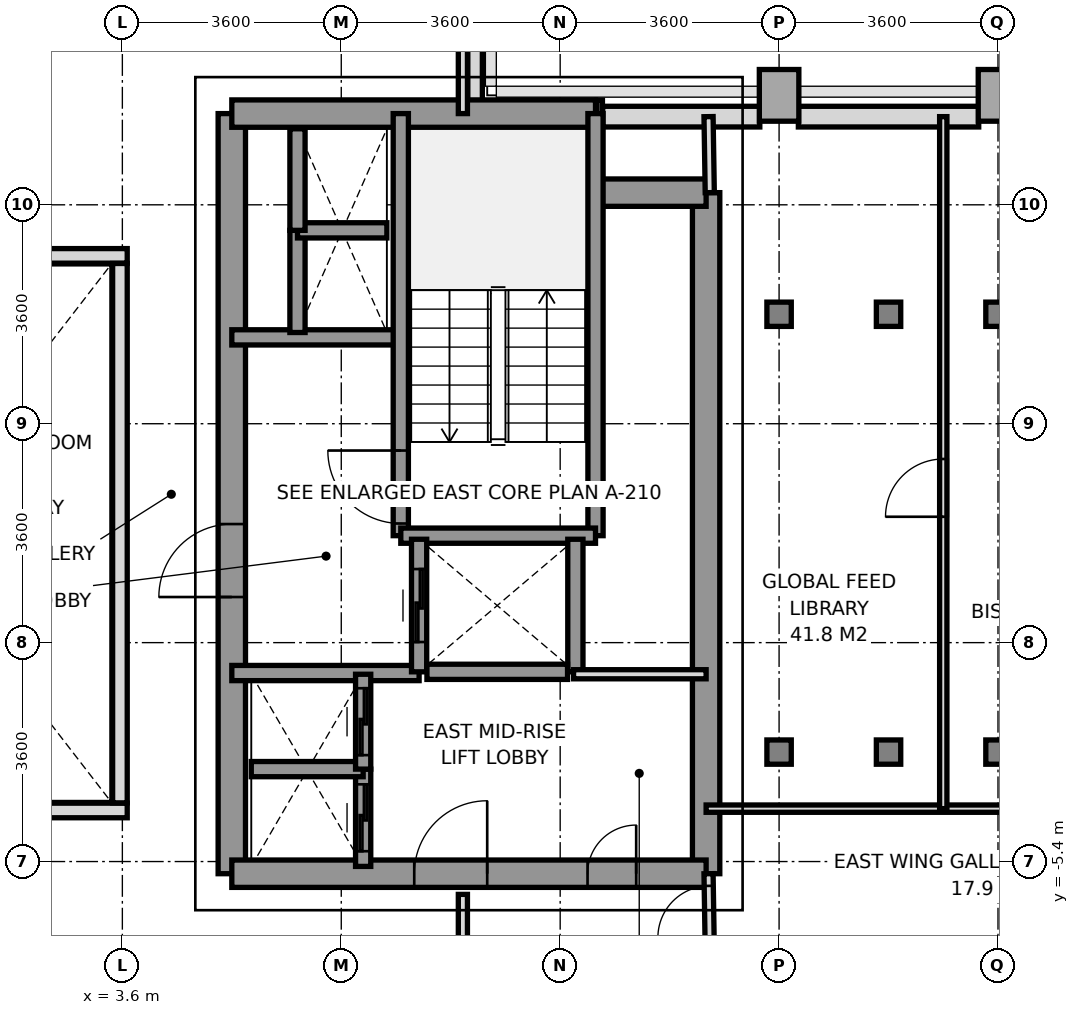
"""IFC4 building model, lengths in metres.
Left out: names, types, materials, properties, quantities, classifications, styles, units other than length and angle.
Written with IfcOpenShell. Run it as: python <this file> out.ifc"""

import sys

from ifc_helpers import new_model, si_unit, direction, frame, frame_2d, origin, origin_2d, place, context, subcontext, project, spatial, rectangle, i_section, extrude, source, transform, mapped, element, fill, save


model = new_model("IFC4")
c1 = context("Model", 3, precision=1e-05, world=origin(), true_north=direction((0.0, 1.0)))
c2 = subcontext(c1, "Body", "Model", "MODEL_VIEW")
j1 = project(units=[si_unit("LENGTHUNIT", "METRE"), si_unit("PLANEANGLEUNIT", "RADIAN")], contexts=[c1])
p1 = place(None, origin())
s1 = spatial("IfcSite", under=j1, at=p1, CompositionType="ELEMENT")
p2 = place(p1, origin())
s2 = spatial("IfcBuilding", under=s1, at=p2, CompositionType="ELEMENT")
p3 = place(p2, frame((0.0, 0.0, 117.6)))
s3 = spatial("IfcBuildingStorey", under=s2, at=p3, CompositionType="ELEMENT", Elevation=117.6)
m1 = source(origin(), c2, "Body", "SweptSolid", [
    extrude(i_section(OverallWidth=0.401, OverallDepth=0.399, WebThickness=0.02, FlangeThickness=0.032, at=origin_2d()), origin(), (0.0, 0.0, 1.0), 3.2),
])
for number, where, z_axis, x_axis in (
    (1, (14.4, -3.6, 0.0), (0.0, 0.0, 1.0), (1.0, 0.0, 0.0)),
    (2, (14.4, 3.6, 0.0), (0.0, 0.0, 1.0), (1.0, 0.0, 0.0)),
):
    element("IfcColumn", number, at=place(p3, frame(where, z_axis=z_axis, x_axis=x_axis)), inside=s3, PredefinedType="COLUMN", context=c2, shape_type="MappedRepresentation", body=[
        mapped(m1, transform((0.0, 0.0, 0.0), x_axis=(1.0, 0.0, 0.0), y_axis=(0.0, 1.0, 0.0), z_axis=(0.0, 0.0, 1.0), scale=1.0)),
    ])
m2 = source(origin(), c2, "Body", "SweptSolid", [
    extrude(rectangle(XDim=0.65, YDim=0.85, at=origin_2d()), origin(), (0.0, 0.0, 1.0), 3.2),
])
p4 = place(p3, frame((14.4, 7.2, 0.0), z_axis=(0.0, 0.0, 1.0), x_axis=(1.0, 0.0, 0.0)))
e3 = element("IfcColumn", 3, at=p4, inside=s3, PredefinedType="COLUMN", context=c2, shape_type="MappedRepresentation", body=[
    mapped(m2, transform((0.0, 0.0, 0.0), x_axis=(1.0, 0.0, 0.0), y_axis=(0.0, 1.0, 0.0), z_axis=(0.0, 0.0, 1.0), scale=1.0)),
])
for number, where, z_axis, x_axis in (
    (4, (16.2, -3.6, 0.0), (0.0, 0.0, 1.0), (1.0, 0.0, 0.0)),
    (5, (16.2, 3.6, 0.0), (0.0, 0.0, 1.0), (1.0, 0.0, 0.0)),
    (6, (18.0, -3.6, 0.0), (0.0, 0.0, 1.0), (1.0, 0.0, 0.0)),
    (7, (18.0, 3.6, 0.0), (0.0, 0.0, 1.0), (1.0, 0.0, 0.0)),
):
    element("IfcColumn", number, at=place(p3, frame(where, z_axis=z_axis, x_axis=x_axis)), inside=s3, PredefinedType="COLUMN", context=c2, shape_type="MappedRepresentation", body=[
        mapped(m1, transform((0.0, 0.0, 0.0), x_axis=(1.0, 0.0, 0.0), y_axis=(0.0, 1.0, 0.0), z_axis=(0.0, 0.0, 1.0), scale=1.0)),
    ])
p5 = place(p3, frame((18.0, 7.2, 0.0), z_axis=(0.0, 0.0, 1.0), x_axis=(1.0, 0.0, 0.0)))
e8 = element("IfcColumn", 8, at=p5, inside=s3, PredefinedType="COLUMN", context=c2, shape_type="MappedRepresentation", body=[
    mapped(m2, transform((0.0, 0.0, 0.0), x_axis=(1.0, 0.0, 0.0), y_axis=(0.0, 1.0, 0.0), z_axis=(0.0, 0.0, 1.0), scale=1.0)),
])
p6 = place(p3, frame((11.498, 6.85, 0.0), z_axis=(0.0, 0.0, 1.0), x_axis=(1.0, 0.0, 0.0)))
e9 = element("IfcWall", 9, at=p6, inside=s3, PredefinedType="SOLIDWALL", context=c2, shape_type="SweptSolid", body=[
    extrude(rectangle(XDim=2.585, YDim=0.34, at=frame_2d((1.292, 0.0))), origin(), (0.0, 0.0, 1.0), 3.2),
])
p7 = place(p3, frame((14.717, 6.85, 0.0), z_axis=(0.0, 0.0, 1.0), x_axis=(1.0, 0.0, 0.0)))
e10 = element("IfcWall", 10, at=p7, inside=s3, PredefinedType="SOLIDWALL", context=c2, shape_type="SweptSolid", body=[
    extrude(rectangle(XDim=2.966, YDim=0.34, at=frame_2d((1.483, 0.0))), origin(), (0.0, 0.0, 1.0), 2.45),
])
p8 = place(p3, frame((9.4, 8.472, 0.0), z_axis=(0.0, 0.0, 1.0), x_axis=(0.0, -1.0, 0.0)))
e11 = element("IfcWall", 11, at=p8, inside=s3, PredefinedType="PARAPET", context=c2, shape_type="SweptSolid", body=[
    extrude(rectangle(XDim=1.519, YDim=0.24, at=frame_2d((0.76, 0.0))), origin(), (0.0, 0.0, 1.0), 1.15),
])
p9 = place(p3, frame((11.403, 7.0, 0.0), z_axis=(0.0, 0.0, 1.0), x_axis=(1.0, 0.0, 0.0)))
e12 = element("IfcWall", 12, at=p9, inside=s3, PredefinedType="PARAPET", context=c2, shape_type="SweptSolid", body=[
    extrude(rectangle(XDim=0.092, YDim=0.24, at=frame_2d((0.046, 0.0))), origin(), (0.0, 0.0, 1.0), 1.15),
])
p10 = place(p3, frame((13.2, -5.6, 0.0), z_axis=(0.0, 0.0, 1.0), x_axis=(0.0, 1.0, 0.0)))
e13 = element("IfcWall", 13, at=p10, inside=s3, PredefinedType="SHEAR", context=c2, shape_type="SweptSolid", body=[
    extrude(rectangle(XDim=11.2, YDim=0.45, at=frame_2d((5.6, 0.0))), origin(), (0.0, 0.0, 1.0), 3.2),
])
p11 = place(p3, frame((5.4, -5.6, 0.0), z_axis=(0.0, 0.0, 1.0), x_axis=(0.0, 1.0, 0.0)))
e14 = element("IfcWall", 14, at=p11, inside=s3, PredefinedType="SHEAR", context=c2, shape_type="SweptSolid", body=[
    extrude(rectangle(XDim=12.5, YDim=0.45, at=frame_2d((6.25, 0.0))), origin(), (0.0, 0.0, 1.0), 3.2),
])
p12 = place(p11, frame((4.55, 0.0, 0.0)))
e15 = element("IfcOpeningElement", 15, at=p12, cuts=e14, PredefinedType="OPENING", context=c2, shape_type="SweptSolid", body=[
    extrude(rectangle(XDim=1.2, YDim=2.2, at=frame_2d((0.6, 1.1))), frame((0.0, 0.235, 0.0), z_axis=(0.0, -1.0, 0.0), x_axis=(1.0, 0.0, 0.0)), (0.0, 0.0, 1.0), 0.47),
])
p13 = place(p3, frame((5.4, 6.9, 0.0), z_axis=(0.0, 0.0, 1.0), x_axis=(1.0, 0.0, 0.0)))
e16 = element("IfcWall", 16, at=p13, inside=s3, PredefinedType="SHEAR", context=c2, shape_type="SweptSolid", body=[
    extrude(rectangle(XDim=5.981, YDim=0.45, at=frame_2d((2.991, 0.0))), origin(), (0.0, 0.0, 1.0), 3.2),
])
p14 = place(p3, frame((11.381, 5.6, 0.0), z_axis=(0.0, 0.0, 1.0), x_axis=(1.0, 0.0, 0.0)))
e17 = element("IfcWall", 17, at=p14, inside=s3, PredefinedType="SHEAR", context=c2, shape_type="SweptSolid", body=[
    extrude(rectangle(XDim=1.819, YDim=0.45, at=frame_2d((0.909, 0.0))), origin(), (0.0, 0.0, 1.0), 3.2),
])
p15 = place(p3, frame((5.4, -5.6, 0.0), z_axis=(0.0, 0.0, 1.0), x_axis=(1.0, 0.0, 0.0)))
e18 = element("IfcWall", 18, at=p15, inside=s3, PredefinedType="SHEAR", context=c2, shape_type="SweptSolid", body=[
    extrude(rectangle(XDim=7.8, YDim=0.45, at=frame_2d((3.9, 0.0))), origin(), (0.0, 0.0, 1.0), 3.2),
])
p16 = place(p15, frame((3.0, 0.0, 0.0)))
e19 = element("IfcOpeningElement", 19, at=p16, cuts=e18, PredefinedType="OPENING", context=c2, shape_type="SweptSolid", body=[
    extrude(rectangle(XDim=1.2, YDim=2.2, at=frame_2d((0.6, 1.1))), frame((0.0, 0.235, 0.0), z_axis=(0.0, -1.0, 0.0), x_axis=(1.0, 0.0, 0.0)), (0.0, 0.0, 1.0), 0.47),
])
p17 = place(p15, frame((5.85, 0.0, 0.0)))
e20 = element("IfcOpeningElement", 20, at=p17, cuts=e18, PredefinedType="OPENING", context=c2, shape_type="SweptSolid", body=[
    extrude(rectangle(XDim=0.8, YDim=2.1, at=frame_2d((0.4, 1.05))), frame((0.0, 0.235, 0.0), z_axis=(0.0, -1.0, 0.0), x_axis=(1.0, 0.0, 0.0)), (0.0, 0.0, 1.0), 0.47),
])
p18 = place(p3, frame((5.4, 3.22, 0.0), z_axis=(0.0, 0.0, 1.0), x_axis=(1.0, 0.0, 0.0)))
e21 = element("IfcWall", 21, at=p18, inside=s3, PredefinedType="SOLIDWALL", context=c2, shape_type="SweptSolid", body=[
    extrude(rectangle(XDim=2.78, YDim=0.25, at=frame_2d((1.39, 0.0))), origin(), (0.0, 0.0, 1.0), 3.2),
])
p19 = place(p3, frame((5.4, -2.3, 0.0), z_axis=(0.0, 0.0, 1.0), x_axis=(1.0, 0.0, 0.0)))
e22 = element("IfcWall", 22, at=p19, inside=s3, PredefinedType="SOLIDWALL", context=c2, shape_type="SweptSolid", body=[
    extrude(rectangle(XDim=3.08, YDim=0.25, at=frame_2d((1.54, 0.0))), origin(), (0.0, 0.0, 1.0), 3.2),
])
p20 = place(p3, frame((8.179, -0.041, 0.0), z_axis=(0.0, 0.0, 1.0), x_axis=(0.0, 1.0, 0.0)))
e23 = element("IfcWall", 23, at=p20, inside=s3, PredefinedType="SOLIDWALL", context=c2, shape_type="SweptSolid", body=[
    extrude(rectangle(XDim=6.941, YDim=0.25, at=frame_2d((3.47, 0.0))), origin(), (0.0, 0.0, 1.0), 3.2),
])
p21 = place(p20, frame((0.2, 0.0, 0.0)))
e24 = element("IfcOpeningElement", 24, at=p21, cuts=e23, PredefinedType="OPENING", context=c2, shape_type="SweptSolid", body=[
    extrude(rectangle(XDim=1.2, YDim=2.2, at=frame_2d((0.6, 1.1))), frame((0.0, 0.135, 0.0), z_axis=(0.0, -1.0, 0.0), x_axis=(1.0, 0.0, 0.0)), (0.0, 0.0, 1.0), 0.27),
])
p22 = place(p3, frame((11.381, -0.041, 0.0), z_axis=(0.0, 0.0, 1.0), x_axis=(0.0, 1.0, 0.0)))
e25 = element("IfcWall", 25, at=p22, inside=s3, PredefinedType="SOLIDWALL", context=c2, shape_type="SweptSolid", body=[
    extrude(rectangle(XDim=6.941, YDim=0.25, at=frame_2d((3.47, 0.0))), origin(), (0.0, 0.0, 1.0), 3.2),
])
p23 = place(p3, frame((8.179, -0.041, 0.0), z_axis=(0.0, 0.0, 1.0), x_axis=(1.0, 0.0, 0.0)))
e26 = element("IfcWall", 26, at=p23, inside=s3, PredefinedType="SOLIDWALL", context=c2, shape_type="SweptSolid", body=[
    extrude(rectangle(XDim=3.202, YDim=0.25, at=frame_2d((1.601, 0.0))), origin(), (0.0, 0.0, 1.0), 3.2),
])
p24 = place(p3, frame((8.48, -2.28, 0.0), z_axis=(0.0, 0.0, 1.0), x_axis=(0.0, 1.0, 0.0)))
e27 = element("IfcWall", 27, at=p24, inside=s3, PredefinedType="SOLIDWALL", context=c2, shape_type="SweptSolid", body=[
    extrude(rectangle(XDim=2.18, YDim=0.25, at=frame_2d((1.09, 0.0))), origin(), (0.0, 0.0, 1.0), 3.2),
])
p25 = place(p24, frame((0.49, 0.0, 0.0)))
e28 = element("IfcOpeningElement", 28, at=p25, cuts=e27, PredefinedType="OPENING", context=c2, shape_type="SweptSolid", body=[
    extrude(rectangle(XDim=1.2, YDim=2.2, at=frame_2d((0.6, 1.1))), frame((0.0, 0.135, 0.0), z_axis=(0.0, -1.0, 0.0), x_axis=(1.0, 0.0, 0.0)), (0.0, 0.0, 1.0), 0.27),
])
p26 = place(p3, frame((11.05, -2.28, 0.0), z_axis=(0.0, 0.0, 1.0), x_axis=(0.0, 1.0, 0.0)))
e29 = element("IfcWall", 29, at=p26, inside=s3, PredefinedType="SOLIDWALL", context=c2, shape_type="SweptSolid", body=[
    extrude(rectangle(XDim=2.18, YDim=0.25, at=frame_2d((1.09, 0.0))), origin(), (0.0, 0.0, 1.0), 3.2),
])
p27 = place(p3, frame((8.609, -2.28, 0.0), z_axis=(0.0, 0.0, 1.0), x_axis=(1.0, 0.0, 0.0)))
e30 = element("IfcWall", 30, at=p27, inside=s3, PredefinedType="SOLIDWALL", context=c2, shape_type="SweptSolid", body=[
    extrude(rectangle(XDim=2.312, YDim=0.25, at=frame_2d((1.156, 0.0))), origin(), (0.0, 0.0, 1.0), 3.2),
])
p28 = place(p3, frame((7.56, -5.48, 0.0), z_axis=(0.0, 0.0, 1.0), x_axis=(0.0, 1.0, 0.0)))
e31 = element("IfcWall", 31, at=p28, inside=s3, PredefinedType="SOLIDWALL", context=c2, shape_type="SweptSolid", body=[
    extrude(rectangle(XDim=1.6, YDim=0.25, at=frame_2d((0.8, 0.0))), origin(), (0.0, 0.0, 1.0), 3.2),
])
p29 = place(p28, frame((0.25, 0.0, 0.0)))
e32 = element("IfcOpeningElement", 32, at=p29, cuts=e31, PredefinedType="OPENING", context=c2, shape_type="SweptSolid", body=[
    extrude(rectangle(XDim=1.1, YDim=2.2, at=frame_2d((0.55, 1.1))), frame((0.0, 0.135, 0.0), z_axis=(0.0, -1.0, 0.0), x_axis=(1.0, 0.0, 0.0)), (0.0, 0.0, 1.0), 0.27),
])
p30 = place(p3, frame((5.72, -3.88, 0.0), z_axis=(0.0, 0.0, 1.0), x_axis=(1.0, 0.0, 0.0)))
e33 = element("IfcWall", 33, at=p30, inside=s3, PredefinedType="SOLIDWALL", context=c2, shape_type="SweptSolid", body=[
    extrude(rectangle(XDim=1.84, YDim=0.25, at=frame_2d((0.92, 0.0))), origin(), (0.0, 0.0, 1.0), 3.2),
])
p31 = place(p3, frame((7.56, -3.88, 0.0), z_axis=(0.0, 0.0, 1.0), x_axis=(0.0, 1.0, 0.0)))
e34 = element("IfcWall", 34, at=p31, inside=s3, PredefinedType="SOLIDWALL", context=c2, shape_type="SweptSolid", body=[
    extrude(rectangle(XDim=1.56, YDim=0.25, at=frame_2d((0.78, 0.0))), origin(), (0.0, 0.0, 1.0), 3.2),
])
p32 = place(p31, frame((0.23, 0.0, 0.0)))
e35 = element("IfcOpeningElement", 35, at=p32, cuts=e34, PredefinedType="OPENING", context=c2, shape_type="SweptSolid", body=[
    extrude(rectangle(XDim=1.1, YDim=2.2, at=frame_2d((0.55, 1.1))), frame((0.0, 0.135, 0.0), z_axis=(0.0, -1.0, 0.0), x_axis=(1.0, 0.0, 0.0)), (0.0, 0.0, 1.0), 0.27),
])
p33 = place(p3, frame((6.48, 3.3, 0.0), z_axis=(0.0, 0.0, 1.0), x_axis=(0.0, 1.0, 0.0)))
e36 = element("IfcWall", 36, at=p33, inside=s3, PredefinedType="SOLIDWALL", context=c2, shape_type="SweptSolid", body=[
    extrude(rectangle(XDim=1.68, YDim=0.25, at=frame_2d((0.84, 0.0))), origin(), (0.0, 0.0, 1.0), 3.2),
])
p34 = place(p3, frame((6.48, 4.98, 0.0), z_axis=(0.0, 0.0, 1.0), x_axis=(1.0, 0.0, 0.0)))
e37 = element("IfcWall", 37, at=p34, inside=s3, PredefinedType="SOLIDWALL", context=c2, shape_type="SweptSolid", body=[
    extrude(rectangle(XDim=1.47, YDim=0.25, at=frame_2d((0.735, 0.0))), origin(), (0.0, 0.0, 1.0), 3.2),
])
p35 = place(p3, frame((6.48, 4.98, 0.0), z_axis=(0.0, 0.0, 1.0), x_axis=(0.0, 1.0, 0.0)))
e38 = element("IfcWall", 38, at=p35, inside=s3, PredefinedType="SOLIDWALL", context=c2, shape_type="SweptSolid", body=[
    extrude(rectangle(XDim=1.67, YDim=0.25, at=frame_2d((0.835, 0.0))), origin(), (0.0, 0.0, 1.0), 3.2),
])
p36 = place(p3, frame((11.02, -2.32, 0.0), z_axis=(0.0, 0.0, 1.0), x_axis=(1.0, 0.0, 0.0)))
e39 = element("IfcWall", 39, at=p36, inside=s3, PredefinedType="PARTITIONING", context=c2, shape_type="SweptSolid", body=[
    extrude(rectangle(XDim=2.18, YDim=0.15, at=frame_2d((1.09, 0.0))), origin(), (0.0, 0.0, 1.0), 3.2),
])
p37 = place(p3, frame((9.2, 6.9, 0.0), z_axis=(0.0, 0.0, 1.0), x_axis=(0.0, 1.0, 0.0)))
e40 = element("IfcWall", 40, at=p37, inside=s3, PredefinedType="PARTITIONING", context=c2, shape_type="SweptSolid", body=[
    extrude(rectangle(XDim=8.78, YDim=0.15, at=frame_2d((4.39, 0.0))), origin(), (0.0, 0.0, 1.0), 2.7),
])
p38 = place(p3, frame((9.2, -15.68, 0.0), z_axis=(0.0, 0.0, 1.0), x_axis=(0.0, 1.0, 0.0)))
e41 = element("IfcWall", 41, at=p38, inside=s3, PredefinedType="PARTITIONING", context=c2, shape_type="SweptSolid", body=[
    extrude(rectangle(XDim=9.74, YDim=0.15, at=frame_2d((4.87, 0.0))), origin(), (0.0, 0.0, 1.0), 2.7),
])
p39 = place(p3, frame((13.26, 5.6, 0.0), z_axis=(0.0, 0.0, 1.0), x_axis=(-0.016013571389, 0.999871774545, 0.0)))
e42 = element("IfcWall", 42, at=p39, inside=s3, PredefinedType="PARTITIONING", context=c2, shape_type="SweptSolid", body=[
    extrude(rectangle(XDim=1.25, YDim=0.15, at=frame_2d((0.625, 0.0))), origin(), (0.0, 0.0, 1.0), 3.2),
])
p40 = place(p3, frame((13.26, -6.85, 0.0), z_axis=(0.0, 0.0, 1.0), x_axis=(-0.016013571389, 0.999871774545, 0.0)))
e43 = element("IfcWall", 43, at=p40, inside=s3, PredefinedType="PARTITIONING", context=c2, shape_type="SweptSolid", body=[
    extrude(rectangle(XDim=1.25, YDim=0.15, at=frame_2d((0.625, 0.0))), origin(), (0.0, 0.0, 1.0), 3.2),
])
p41 = place(p40, frame((0.2, 0.0, 0.0)))
e44 = element("IfcOpeningElement", 44, at=p41, cuts=e43, PredefinedType="OPENING", context=c2, shape_type="SweptSolid", body=[
    extrude(rectangle(XDim=0.85, YDim=2.1, at=frame_2d((0.425, 1.05))), frame((0.0, 0.085, 0.0), z_axis=(0.0, -1.0, 0.0), x_axis=(1.0, 0.0, 0.0)), (0.0, 0.0, 1.0), 0.17),
])
p42 = place(p3, frame((13.2, -4.53, 0.0), z_axis=(0.0, 0.0, 1.0), x_axis=(1.0, 0.0, 0.0)))
e45 = element("IfcWall", 45, at=p42, inside=s3, PredefinedType="PARTITIONING", context=c2, shape_type="SweptSolid", body=[
    extrude(rectangle(XDim=10.1, YDim=0.12, at=frame_2d((5.05, 0.0))), origin(), (0.0, 0.0, 1.0), 2.76),
])
p43 = place(p42, frame((7.75, 0.0, 0.0)))
e46 = element("IfcOpeningElement", 46, at=p43, cuts=e45, PredefinedType="OPENING", context=c2, shape_type="SweptSolid", body=[
    extrude(rectangle(XDim=0.95, YDim=2.15, at=frame_2d((0.475, 1.075))), frame((0.0, 0.07, 0.0), z_axis=(0.0, -1.0, 0.0), x_axis=(1.0, 0.0, 0.0)), (0.0, 0.0, 1.0), 0.14),
])
p44 = place(p3, frame((17.1, -4.53, 0.0), z_axis=(0.0, 0.0, 1.0), x_axis=(0.0, 1.0, 0.0)))
e47 = element("IfcWall", 47, at=p44, inside=s3, PredefinedType="PARTITIONING", context=c2, shape_type="SweptSolid", body=[
    extrude(rectangle(XDim=11.38, YDim=0.12, at=frame_2d((5.69, 0.0))), origin(), (0.0, 0.0, 1.0), 2.7),
])
p45 = place(p44, frame((4.8, 0.0, 0.0)))
e48 = element("IfcOpeningElement", 48, at=p45, cuts=e47, PredefinedType="OPENING", context=c2, shape_type="SweptSolid", body=[
    extrude(rectangle(XDim=0.95, YDim=2.15, at=frame_2d((0.475, 1.075))), frame((0.0, 0.07, 0.0), z_axis=(0.0, -1.0, 0.0), x_axis=(1.0, 0.0, 0.0)), (0.0, 0.0, 1.0), 0.14),
])
for number, where, z_axis, x_axis in (
    (49, (-3.68, -4.56, 0.0), (0.0, 0.0, 1.0), (1.0, 0.0, 0.0)),
    (50, (-3.68, 4.56, 0.0), (0.0, 0.0, 1.0), (1.0, 0.0, 0.0)),
):
    element("IfcWall", number, at=place(p3, frame(where, z_axis=z_axis, x_axis=x_axis)), inside=s3, PredefinedType="PARAPET", context=c2, shape_type="SweptSolid", body=[
        extrude(rectangle(XDim=7.36, YDim=0.24, at=frame_2d((3.68, 0.0))), origin(), (0.0, 0.0, 1.0), 1.15),
    ])
p46 = place(p3, frame((3.56, -4.435, 0.0), z_axis=(0.0, 0.0, 1.0), x_axis=(0.0, 1.0, 0.0)))
e51 = element("IfcWall", 51, at=p46, inside=s3, PredefinedType="PARAPET", context=c2, shape_type="SweptSolid", body=[
    extrude(rectangle(XDim=8.87, YDim=0.24, at=frame_2d((4.435, 0.0))), origin(), (0.0, 0.0, 1.0), 1.15),
])
m3 = source(origin(), c2, "Body", "SweptSolid", [
    extrude(rectangle(XDim=1.2, YDim=2.2, at=frame_2d((0.6, 1.1))), frame((0.0, 0.025, 0.0), z_axis=(0.0, -1.0, 0.0), x_axis=(1.0, 0.0, 0.0)), (0.0, 0.0, 1.0), 0.05),
])
p47 = place(p21, origin())
e52 = element("IfcDoor", 52, at=p47, inside=s3, OperationType="SINGLE_SWING_RIGHT", PredefinedType="DOOR", context=c2, shape_type="MappedRepresentation", body=[
    mapped(m3, transform((0.0, 0.0, 0.0), x_axis=(1.0, 0.0, 0.0), y_axis=(0.0, 1.0, 0.0), z_axis=(0.0, 0.0, 1.0), scale=1.0)),
])
fill(e24, e52)
p48 = place(p12, origin())
e53 = element("IfcDoor", 53, at=p48, inside=s3, OperationType="SINGLE_SWING_LEFT", PredefinedType="DOOR", context=c2, shape_type="MappedRepresentation", body=[
    mapped(m3, transform((0.0, 0.0, 0.0), x_axis=(1.0, 0.0, 0.0), y_axis=(0.0, 1.0, 0.0), z_axis=(0.0, 0.0, 1.0), scale=1.0)),
])
fill(e15, e53)
p49 = place(p16, origin())
e54 = element("IfcDoor", 54, at=p49, inside=s3, OperationType="SINGLE_SWING_RIGHT", PredefinedType="DOOR", context=c2, shape_type="MappedRepresentation", body=[
    mapped(m3, transform((0.0, 0.0, 0.0), x_axis=(1.0, 0.0, 0.0), y_axis=(0.0, 1.0, 0.0), z_axis=(0.0, 0.0, 1.0), scale=1.0)),
])
fill(e19, e54)
m4 = source(origin(), c2, "Body", "SweptSolid", [
    extrude(rectangle(XDim=0.8, YDim=2.1, at=frame_2d((0.4, 1.05))), frame((0.0, 0.025, 0.0), z_axis=(0.0, -1.0, 0.0), x_axis=(1.0, 0.0, 0.0)), (0.0, 0.0, 1.0), 0.05),
])
p50 = place(p17, origin())
e55 = element("IfcDoor", 55, at=p50, inside=s3, OperationType="SINGLE_SWING_RIGHT", PredefinedType="DOOR", context=c2, shape_type="MappedRepresentation", body=[
    mapped(m4, transform((0.0, 0.0, 0.0), x_axis=(1.0, 0.0, 0.0), y_axis=(0.0, 1.0, 0.0), z_axis=(0.0, 0.0, 1.0), scale=1.0)),
])
fill(e20, e55)
p51 = place(p25, origin())
e56 = element("IfcDoor", 56, at=p51, inside=s3, OperationType="SLIDING_TO_RIGHT", PredefinedType="DOOR", context=c2, shape_type="MappedRepresentation", body=[
    mapped(m3, transform((0.0, 0.0, 0.0), x_axis=(1.0, 0.0, 0.0), y_axis=(0.0, 1.0, 0.0), z_axis=(0.0, 0.0, 1.0), scale=1.0)),
])
fill(e28, e56)
m5 = source(origin(), c2, "Body", "SweptSolid", [
    extrude(rectangle(XDim=1.1, YDim=2.2, at=frame_2d((0.55, 1.1))), frame((0.0, 0.025, 0.0), z_axis=(0.0, -1.0, 0.0), x_axis=(1.0, 0.0, 0.0)), (0.0, 0.0, 1.0), 0.05),
])
p52 = place(p29, origin())
e57 = element("IfcDoor", 57, at=p52, inside=s3, OperationType="SLIDING_TO_LEFT", PredefinedType="DOOR", context=c2, shape_type="MappedRepresentation", body=[
    mapped(m5, transform((0.0, 0.0, 0.0), x_axis=(1.0, 0.0, 0.0), y_axis=(0.0, 1.0, 0.0), z_axis=(0.0, 0.0, 1.0), scale=1.0)),
])
fill(e32, e57)
p53 = place(p32, origin())
e58 = element("IfcDoor", 58, at=p53, inside=s3, OperationType="SLIDING_TO_LEFT", PredefinedType="DOOR", context=c2, shape_type="MappedRepresentation", body=[
    mapped(m5, transform((0.0, 0.0, 0.0), x_axis=(1.0, 0.0, 0.0), y_axis=(0.0, 1.0, 0.0), z_axis=(0.0, 0.0, 1.0), scale=1.0)),
])
fill(e35, e58)
m6 = source(origin(), c2, "Body", "SweptSolid", [
    extrude(rectangle(XDim=0.85, YDim=2.1, at=frame_2d((0.425, 1.05))), frame((0.0, 0.025, 0.0), z_axis=(0.0, -1.0, 0.0), x_axis=(1.0, 0.0, 0.0)), (0.0, 0.0, 1.0), 0.05),
])
p54 = place(p41, origin())
e59 = element("IfcDoor", 59, at=p54, inside=s3, OperationType="SINGLE_SWING_LEFT", PredefinedType="DOOR", context=c2, shape_type="MappedRepresentation", body=[
    mapped(m6, transform((0.0, 0.0, 0.0), x_axis=(1.0, 0.0, 0.0), y_axis=(0.0, 1.0, 0.0), z_axis=(0.0, 0.0, 1.0), scale=1.0)),
])
fill(e44, e59)
m7 = source(origin(), c2, "Body", "SweptSolid", [
    extrude(rectangle(XDim=0.95, YDim=2.15, at=frame_2d((0.475, 1.075))), frame((0.0, 0.025, 0.0), z_axis=(0.0, -1.0, 0.0), x_axis=(1.0, 0.0, 0.0)), (0.0, 0.0, 1.0), 0.05),
])
p55 = place(p45, origin())
e60 = element("IfcDoor", 60, at=p55, inside=s3, OperationType="SINGLE_SWING_LEFT", PredefinedType="DOOR", context=c2, shape_type="MappedRepresentation", body=[
    mapped(m7, transform((0.0, 0.0, 0.0), x_axis=(1.0, 0.0, 0.0), y_axis=(0.0, 1.0, 0.0), z_axis=(0.0, 0.0, 1.0), scale=1.0)),
])
fill(e48, e60)
save(model, sys.argv[1])
